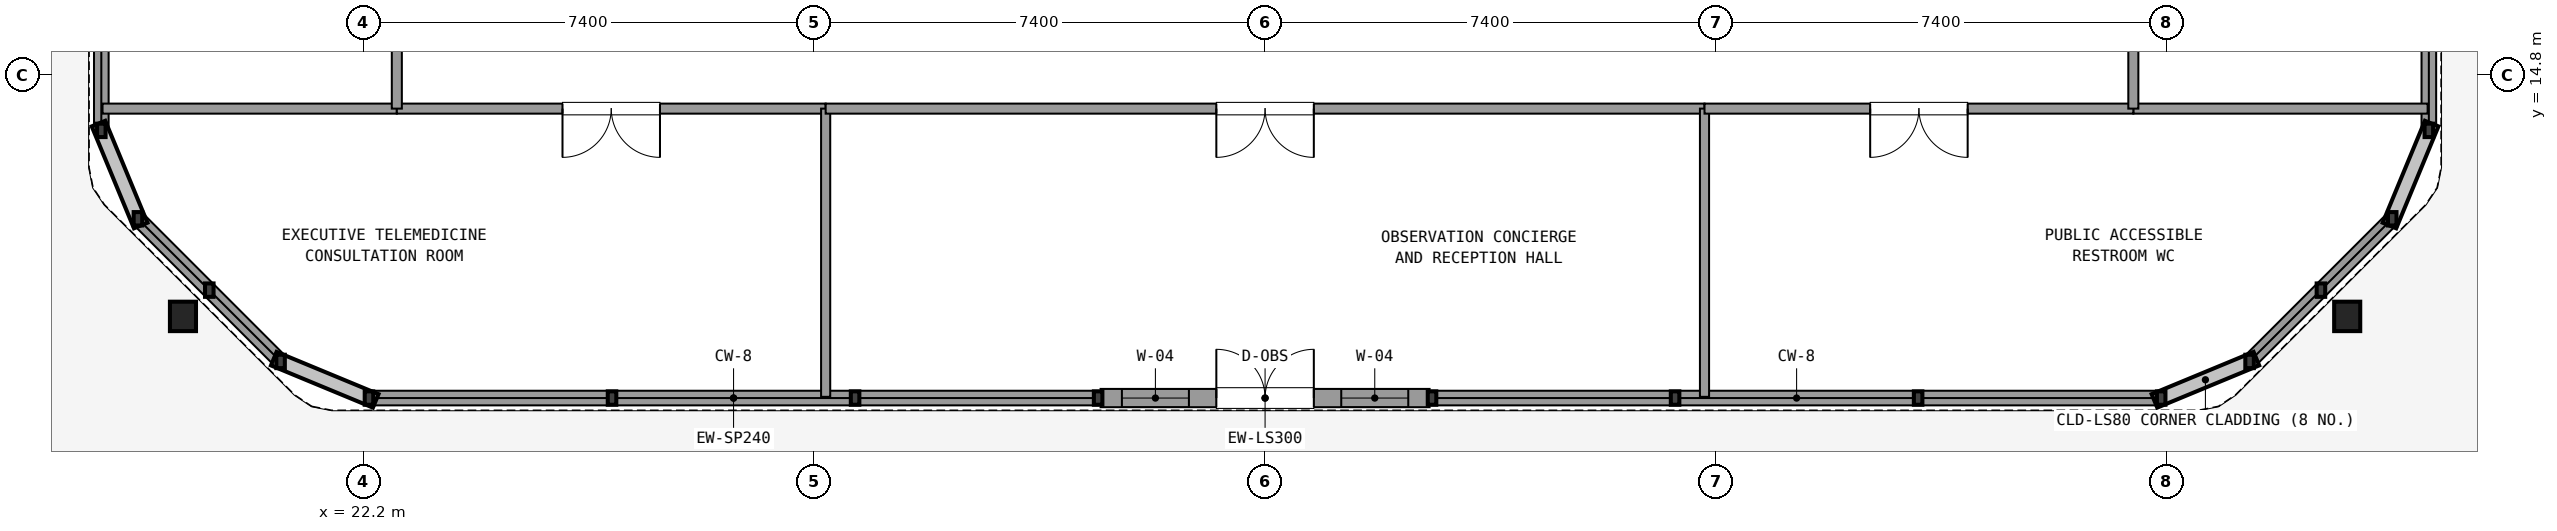
"""IFC4 building model, lengths in metres.
Left out: names, types, materials, properties, quantities, classifications, styles, units other than length and angle.
Written with IfcOpenShell. Run it as: python <this file> out.ifc"""

import sys

from ifc_helpers import new_model, si_unit, direction, frame, frame_2d, origin, origin_2d, place, context, subcontext, project, spatial, rectangle, i_section, extrude, element, fill, save


model = new_model("IFC4")
c1 = context("Model", 3, precision=1e-05, world=origin(), true_north=direction((0.0, 1.0)))
c2 = subcontext(c1, "Body", "Model", "MODEL_VIEW")
j1 = project(units=[si_unit("LENGTHUNIT", "METRE"), si_unit("PLANEANGLEUNIT", "RADIAN")], contexts=[c1])
p1 = place(None, origin())
s1 = spatial("IfcSite", under=j1, at=p1, CompositionType="ELEMENT")
p2 = place(p1, origin())
s2 = spatial("IfcBuilding", under=s1, at=p2, CompositionType="ELEMENT")
p3 = place(p2, frame((0.0, 0.0, 294.66)))
s3 = spatial("IfcBuildingStorey", under=s2, at=p3, CompositionType="ELEMENT", Elevation=294.66)
for number, where, z_axis, x_axis in (
    (1, (19.24, 10.84, 0.0), (0.0, 0.0, 1.0), (1.0, 0.0, 0.0)),
    (2, (54.76, 10.84, 0.0), (0.0, 0.0, 1.0), (1.0, 0.0, 0.0)),
):
    element("IfcColumn", number, at=place(p3, frame(where, z_axis=z_axis, x_axis=x_axis)), inside=s3, PredefinedType="COLUMN", context=c2, shape_type="SweptSolid", body=[
        extrude(i_section(OverallWidth=0.428, OverallDepth=0.483, WebThickness=0.042, FlangeThickness=0.068, at=origin_2d()), origin(), (0.0, 0.0, 1.0), 4.32),
    ])
p4 = place(p3, frame((34.3, 9.5, 0.0), z_axis=(0.0, 0.0, 1.0), x_axis=(1.0, 0.0, 0.0)))
e3 = element("IfcWall", 3, at=p4, inside=s3, PredefinedType="SOLIDWALL", context=c2, shape_type="SweptSolid", body=[
    extrude(rectangle(XDim=5.4, YDim=0.3, at=frame_2d((2.7, 0.0))), origin(), (0.0, 0.0, 1.0), 3.46),
])
p5 = place(p4, frame((1.9, 0.0, 0.0)))
e4 = element("IfcOpeningElement", 4, at=p5, cuts=e3, PredefinedType="OPENING", context=c2, shape_type="SweptSolid", body=[
    extrude(rectangle(XDim=1.6, YDim=2.2, at=frame_2d((0.8, 1.1))), frame((0.0, 0.16, 0.0), z_axis=(0.0, -1.0, 0.0), x_axis=(1.0, 0.0, 0.0)), (0.0, 0.0, 1.0), 0.32),
])
p6 = place(p4, frame((0.35, 0.0, 0.4)))
e5 = element("IfcOpeningElement", 5, at=p6, cuts=e3, PredefinedType="OPENING", context=c2, shape_type="SweptSolid", body=[
    extrude(rectangle(XDim=1.1, YDim=1.8, at=frame_2d((0.55, 0.9))), frame((0.0, 0.16, 0.0), z_axis=(0.0, -1.0, 0.0), x_axis=(1.0, 0.0, 0.0)), (0.0, 0.0, 1.0), 0.32),
])
p7 = place(p4, frame((3.95, 0.0, 0.4)))
e6 = element("IfcOpeningElement", 6, at=p7, cuts=e3, PredefinedType="OPENING", context=c2, shape_type="SweptSolid", body=[
    extrude(rectangle(XDim=1.1, YDim=1.8, at=frame_2d((0.55, 0.9))), frame((0.0, 0.16, 0.0), z_axis=(0.0, -1.0, 0.0), x_axis=(1.0, 0.0, 0.0)), (0.0, 0.0, 1.0), 0.32),
])
for number, where, z_axis, x_axis in (
    (7, (22.293, 9.5, 0.0), (0.0, 0.0, 1.0), (1.0, 0.0, 0.0)),
    (8, (39.74, 9.5, 0.0), (0.0, 0.0, 1.0), (1.0, 0.0, 0.0)),
):
    element("IfcWall", number, at=place(p3, frame(where, z_axis=z_axis, x_axis=x_axis)), inside=s3, PredefinedType="SOLIDWALL", context=c2, shape_type="SweptSolid", body=[
        extrude(rectangle(XDim=11.967, YDim=0.24, at=frame_2d((5.983, 0.0))), origin(), (0.0, 0.0, 1.0), 0.85),
    ])
p8 = place(p3, frame((53.158, 10.101, 0.0), z_axis=(0.0, 0.0, 1.0), x_axis=(0.707143652874, 0.707069907577, 0.0)))
e9 = element("IfcWall", 9, at=p8, inside=s3, PredefinedType="SOLIDWALL", context=c2, shape_type="SweptSolid", body=[
    extrude(rectangle(XDim=3.311, YDim=0.24, at=frame_2d((1.655, 0.0))), origin(), (0.0, 0.0, 1.0), 0.85),
])
for number, where, z_axis, x_axis in (
    (10, (56.1, 13.893, 0.0), (0.0, 0.0, 1.0), (0.0, 1.0, 0.0)),
    (11, (17.9, 23.16, 0.0), (0.0, 0.0, 1.0), (0.0, -1.0, 0.0)),
):
    element("IfcWall", number, at=place(p3, frame(where, z_axis=z_axis, x_axis=x_axis)), inside=s3, PredefinedType="SOLIDWALL", context=c2, shape_type="SweptSolid", body=[
        extrude(rectangle(XDim=9.267, YDim=0.24, at=frame_2d((4.633, 0.0))), origin(), (0.0, 0.0, 1.0), 0.85),
    ])
p9 = place(p3, frame((18.501, 12.442, 0.0), z_axis=(0.0, 0.0, 1.0), x_axis=(0.707143652874, -0.707069907577, 0.0)))
e12 = element("IfcWall", 12, at=p9, inside=s3, PredefinedType="SOLIDWALL", context=c2, shape_type="SweptSolid", body=[
    extrude(rectangle(XDim=3.311, YDim=0.24, at=frame_2d((1.655, 0.0))), origin(), (0.0, 0.0, 1.0), 0.85),
])
for number, where, z_axis, x_axis in (
    (13, (17.92, 14.25, 0.0), (0.0, 0.0, 1.0), (1.0, 0.0, 0.0)),
    (14, (51.25, 14.25, 0.0), (0.0, 0.0, 1.0), (1.0, 0.0, 0.0)),
):
    element("IfcWall", number, at=place(p3, frame(where, z_axis=z_axis, x_axis=x_axis)), inside=s3, PredefinedType="PARTITIONING", context=c2, shape_type="SweptSolid", body=[
        extrude(rectangle(XDim=4.83, YDim=0.165, at=frame_2d((2.415, 0.0))), origin(), (0.0, 0.0, 1.0), 3.31),
    ])
p10 = place(p3, frame((22.75, 14.25, 0.0), z_axis=(0.0, 0.0, 1.0), x_axis=(1.0, 0.0, 0.0)))
e15 = element("IfcWall", 15, at=p10, inside=s3, PredefinedType="PARTITIONING", context=c2, shape_type="SweptSolid", body=[
    extrude(rectangle(XDim=7.038, YDim=0.165, at=frame_2d((3.519, 0.0))), origin(), (0.0, 0.0, 1.0), 3.31),
])
p11 = place(p10, frame((2.719, 0.0, 0.0)))
e16 = element("IfcOpeningElement", 16, at=p11, cuts=e15, PredefinedType="OPENING", context=c2, shape_type="SweptSolid", body=[
    extrude(rectangle(XDim=1.6, YDim=2.2, at=frame_2d((0.8, 1.1))), frame((0.0, 0.093, 0.0), z_axis=(0.0, -1.0, 0.0), x_axis=(1.0, 0.0, 0.0)), (0.0, 0.0, 1.0), 0.185),
])
p12 = place(p3, frame((29.788, 14.25, 0.0), z_axis=(0.0, 0.0, 1.0), x_axis=(0.0, -1.0, 0.0)))
e17 = element("IfcWall", 17, at=p12, inside=s3, PredefinedType="PARTITIONING", context=c2, shape_type="SweptSolid", body=[
    extrude(rectangle(XDim=4.73, YDim=0.15, at=frame_2d((2.365, 0.0))), origin(), (0.0, 0.0, 1.0), 3.31),
])
p13 = place(p3, frame((29.788, 14.25, 0.0), z_axis=(0.0, 0.0, 1.0), x_axis=(1.0, 0.0, 0.0)))
e18 = element("IfcWall", 18, at=p13, inside=s3, PredefinedType="PARTITIONING", context=c2, shape_type="SweptSolid", body=[
    extrude(rectangle(XDim=14.424, YDim=0.165, at=frame_2d((7.212, 0.0))), origin(), (0.0, 0.0, 1.0), 3.31),
])
p14 = place(p13, frame((6.412, 0.0, 0.0)))
e19 = element("IfcOpeningElement", 19, at=p14, cuts=e18, PredefinedType="OPENING", context=c2, shape_type="SweptSolid", body=[
    extrude(rectangle(XDim=1.6, YDim=2.2, at=frame_2d((0.8, 1.1))), frame((0.0, 0.093, 0.0), z_axis=(0.0, -1.0, 0.0), x_axis=(1.0, 0.0, 0.0)), (0.0, 0.0, 1.0), 0.185),
])
p15 = place(p3, frame((44.212, 14.25, 0.0), z_axis=(0.0, 0.0, 1.0), x_axis=(0.0, -1.0, 0.0)))
e20 = element("IfcWall", 20, at=p15, inside=s3, PredefinedType="PARTITIONING", context=c2, shape_type="SweptSolid", body=[
    extrude(rectangle(XDim=4.73, YDim=0.15, at=frame_2d((2.365, 0.0))), origin(), (0.0, 0.0, 1.0), 3.31),
])
p16 = place(p3, frame((44.212, 14.25, 0.0), z_axis=(0.0, 0.0, 1.0), x_axis=(1.0, 0.0, 0.0)))
e21 = element("IfcWall", 21, at=p16, inside=s3, PredefinedType="PARTITIONING", context=c2, shape_type="SweptSolid", body=[
    extrude(rectangle(XDim=7.038, YDim=0.165, at=frame_2d((3.519, 0.0))), origin(), (0.0, 0.0, 1.0), 3.31),
])
p17 = place(p16, frame((2.719, 0.0, 0.0)))
e22 = element("IfcOpeningElement", 22, at=p17, cuts=e21, PredefinedType="OPENING", context=c2, shape_type="SweptSolid", body=[
    extrude(rectangle(XDim=1.6, YDim=2.2, at=frame_2d((0.8, 1.1))), frame((0.0, 0.093, 0.0), z_axis=(0.0, -1.0, 0.0), x_axis=(1.0, 0.0, 0.0)), (0.0, 0.0, 1.0), 0.185),
])
p18 = place(p3, frame((22.75, 14.25, 0.0), z_axis=(0.0, 0.0, 1.0), x_axis=(0.0, 1.0, 0.0)))
e23 = element("IfcWall", 23, at=p18, inside=s3, PredefinedType="PARTITIONING", context=c2, shape_type="SweptSolid", body=[
    extrude(rectangle(XDim=23.3, YDim=0.165, at=frame_2d((11.65, 0.0))), origin(), (0.0, 0.0, 1.0), 3.31),
])
p19 = place(p18, frame((10.85, 0.0, 0.0)))
e24 = element("IfcOpeningElement", 24, at=p19, cuts=e23, PredefinedType="OPENING", context=c2, shape_type="SweptSolid", body=[
    extrude(rectangle(XDim=1.6, YDim=2.2, at=frame_2d((0.8, 1.1))), frame((0.0, 0.093, 0.0), z_axis=(0.0, -1.0, 0.0), x_axis=(1.0, 0.0, 0.0)), (0.0, 0.0, 1.0), 0.185),
])
p20 = place(p3, frame((51.25, 14.25, 0.0), z_axis=(0.0, 0.0, 1.0), x_axis=(0.0, 1.0, 0.0)))
e25 = element("IfcWall", 25, at=p20, inside=s3, PredefinedType="PARTITIONING", context=c2, shape_type="SweptSolid", body=[
    extrude(rectangle(XDim=23.3, YDim=0.165, at=frame_2d((11.65, 0.0))), origin(), (0.0, 0.0, 1.0), 3.31),
])
p21 = place(p20, frame((10.85, 0.0, 0.0)))
e26 = element("IfcOpeningElement", 26, at=p21, cuts=e25, PredefinedType="OPENING", context=c2, shape_type="SweptSolid", body=[
    extrude(rectangle(XDim=1.6, YDim=2.2, at=frame_2d((0.8, 1.1))), frame((0.0, 0.093, 0.0), z_axis=(0.0, -1.0, 0.0), x_axis=(1.0, 0.0, 0.0)), (0.0, 0.0, 1.0), 0.185),
])
p22 = place(p5, origin())
e27 = element("IfcDoor", 27, at=p22, inside=s3, OperationType="DOUBLE_DOOR_SINGLE_SWING", PredefinedType="DOOR", context=c2, shape_type="SweptSolid", body=[
    extrude(rectangle(XDim=1.6, YDim=2.2, at=frame_2d((0.8, 1.1))), frame((0.0, 0.025, 0.0), z_axis=(0.0, -1.0, 0.0), x_axis=(1.0, 0.0, 0.0)), (0.0, 0.0, 1.0), 0.05),
])
fill(e4, e27)
p23 = place(p6, origin())
e28 = element("IfcWindow", 28, at=p23, inside=s3, PartitioningType="SINGLE_PANEL", PredefinedType="WINDOW", context=c2, shape_type="SweptSolid", body=[
    extrude(rectangle(XDim=1.1, YDim=1.8, at=frame_2d((0.55, 0.9))), frame((0.0, 0.03, 0.0), z_axis=(0.0, -1.0, 0.0), x_axis=(1.0, 0.0, 0.0)), (0.0, 0.0, 1.0), 0.06),
])
fill(e5, e28)
p24 = place(p7, origin())
e29 = element("IfcWindow", 29, at=p24, inside=s3, PartitioningType="SINGLE_PANEL", PredefinedType="WINDOW", context=c2, shape_type="SweptSolid", body=[
    extrude(rectangle(XDim=1.1, YDim=1.8, at=frame_2d((0.55, 0.9))), frame((0.0, 0.03, 0.0), z_axis=(0.0, -1.0, 0.0), x_axis=(1.0, 0.0, 0.0)), (0.0, 0.0, 1.0), 0.06),
])
fill(e6, e29)
p25 = place(p11, frame((1.6, 0.0, 0.0), z_axis=(0.0, 0.0, 1.0), x_axis=(-1.0, 0.0, 0.0)))
e30 = element("IfcDoor", 30, at=p25, inside=s3, OperationType="DOUBLE_DOOR_SINGLE_SWING", PredefinedType="DOOR", context=c2, shape_type="SweptSolid", body=[
    extrude(rectangle(XDim=1.6, YDim=2.2, at=frame_2d((0.8, 1.1))), frame((0.0, 0.025, 0.0), z_axis=(0.0, -1.0, 0.0), x_axis=(1.0, 0.0, 0.0)), (0.0, 0.0, 1.0), 0.05),
])
fill(e16, e30)
p26 = place(p14, frame((1.6, 0.0, 0.0), z_axis=(0.0, 0.0, 1.0), x_axis=(-1.0, 0.0, 0.0)))
e31 = element("IfcDoor", 31, at=p26, inside=s3, OperationType="DOUBLE_DOOR_SINGLE_SWING", PredefinedType="DOOR", context=c2, shape_type="SweptSolid", body=[
    extrude(rectangle(XDim=1.6, YDim=2.2, at=frame_2d((0.8, 1.1))), frame((0.0, 0.025, 0.0), z_axis=(0.0, -1.0, 0.0), x_axis=(1.0, 0.0, 0.0)), (0.0, 0.0, 1.0), 0.05),
])
fill(e19, e31)
p27 = place(p17, frame((1.6, 0.0, 0.0), z_axis=(0.0, 0.0, 1.0), x_axis=(-1.0, 0.0, 0.0)))
e32 = element("IfcDoor", 32, at=p27, inside=s3, OperationType="DOUBLE_DOOR_SINGLE_SWING", PredefinedType="DOOR", context=c2, shape_type="SweptSolid", body=[
    extrude(rectangle(XDim=1.6, YDim=2.2, at=frame_2d((0.8, 1.1))), frame((0.0, 0.025, 0.0), z_axis=(0.0, -1.0, 0.0), x_axis=(1.0, 0.0, 0.0)), (0.0, 0.0, 1.0), 0.05),
])
fill(e22, e32)
save(model, sys.argv[1])
